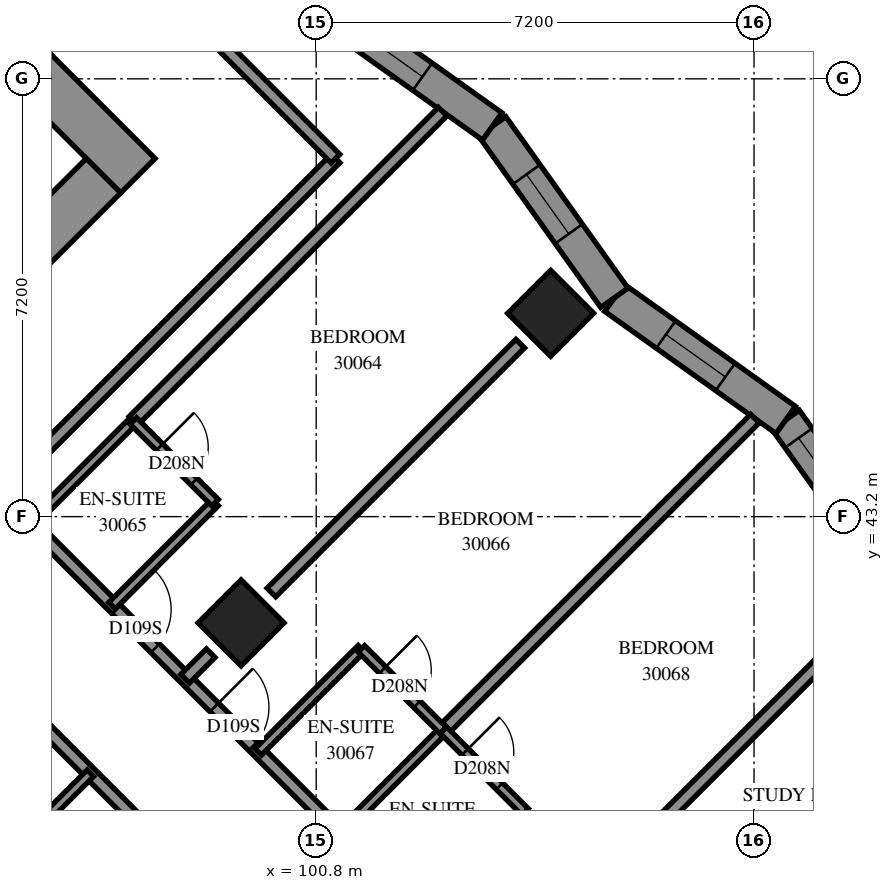
"""IFC4 building model, lengths in metres.
Left out: names, types, materials, properties, quantities, classifications, styles, units other than length and angle.
Written with IfcOpenShell. Run it as: python <this file> out.ifc"""

import sys

from ifc_helpers import new_model, si_unit, direction, frame, frame_2d, origin, origin_2d, place, context, subcontext, project, spatial, polyline, rectangle, outline, extrude, element, fill, save


model = new_model("IFC4")
c1 = context("Model", 3, precision=1e-05, world=origin(), true_north=direction((0.0, 1.0)))
c2 = subcontext(c1, "Body", "Model", "MODEL_VIEW")
j1 = project(units=[si_unit("LENGTHUNIT", "METRE"), si_unit("PLANEANGLEUNIT", "RADIAN")], contexts=[c1])
p1 = place(None, origin())
s1 = spatial("IfcSite", under=j1, at=p1, CompositionType="ELEMENT")
p2 = place(p1, origin())
s2 = spatial("IfcBuilding", under=s1, at=p2, CompositionType="ELEMENT")
p3 = place(p2, frame((0.0, 0.0, 111.8)))
s3 = spatial("IfcBuildingStorey", under=s2, at=p3, CompositionType="ELEMENT", Elevation=111.8)
for number, where, z_axis, x_axis in (
    (1, (104.656, 46.544, 0.0), (0.0, 0.0, 1.0), (0.707, -0.707, 0.0)),
    (2, (99.565, 41.453, 0.0), (0.0, 0.0, 1.0), (0.707, -0.707, 0.0)),
):
    element("IfcColumn", number, at=place(p3, frame(where, z_axis=z_axis, x_axis=x_axis)), inside=s3, PredefinedType="COLUMN", context=c2, shape_type="SweptSolid", body=[
        extrude(rectangle(XDim=1.0, YDim=1.0, at=origin_2d()), origin(), (0.0, 0.0, 1.0), 3.1),
    ])
p4 = place(p3, frame((86.554, 60.121, -0.3), z_axis=(0.0, 0.0, 1.0), x_axis=(0.7071067812, -0.7071067812, 0.0)))
e3 = element("IfcWall", 3, at=p4, inside=s3, PredefinedType="SHEAR", context=c2, shape_type="SweptSolid", body=[
    extrude(rectangle(XDim=16.0, YDim=0.8, at=frame_2d((8.0, 0.0))), origin(), (0.0, 0.0, 1.0), 2.7),
])
p5 = place(p4, frame((10.8, 0.0, 0.3)))
e4 = element("IfcOpeningElement", 4, at=p5, cuts=e3, PredefinedType="OPENING", context=c2, shape_type="SweptSolid", body=[
    extrude(rectangle(XDim=0.8, YDim=2.1, at=frame_2d((0.4, 1.05))), frame((0.0, 0.41, 0.0), z_axis=(0.0, -1.0, 0.0), x_axis=(1.0, 0.0, 0.0)), (0.0, 0.0, 1.0), 0.82),
])
p6 = place(p3, frame((87.12, 38.625, -0.3), z_axis=(0.0, 0.0, 1.0), x_axis=(0.7071067812, 0.7071067812, 0.0)))
e5 = element("IfcWall", 5, at=p6, inside=s3, PredefinedType="SHEAR", context=c2, shape_type="SweptSolid", body=[
    extrude(rectangle(XDim=14.4, YDim=0.8, at=frame_2d((7.2, 0.0))), origin(), (0.0, 0.0, 1.0), 2.7),
])
p7 = place(p6, frame((4.55, 0.0, 0.3)))
e6 = element("IfcOpeningElement", 6, at=p7, cuts=e5, PredefinedType="OPENING", context=c2, shape_type="SweptSolid", body=[
    extrude(rectangle(XDim=1.1, YDim=2.1, at=frame_2d((0.55, 1.05))), frame((0.0, 0.41, 0.0), z_axis=(0.0, -1.0, 0.0), x_axis=(1.0, 0.0, 0.0)), (0.0, 0.0, 1.0), 0.82),
])
p8 = place(p6, frame((11.35, 0.0, 0.3)))
e7 = element("IfcOpeningElement", 7, at=p8, cuts=e5, PredefinedType="OPENING", context=c2, shape_type="SweptSolid", body=[
    extrude(rectangle(XDim=1.1, YDim=2.1, at=frame_2d((0.55, 1.05))), frame((0.0, 0.41, 0.0), z_axis=(0.0, -1.0, 0.0), x_axis=(1.0, 0.0, 0.0)), (0.0, 0.0, 1.0), 0.82),
])
p9 = place(p3, frame((109.358, 36.362, 0.0), z_axis=(0.0, 0.0, 1.0), x_axis=(0.7071067812, 0.7071067812, 0.0)))
e8 = element("IfcWall", 8, at=p9, inside=s3, PredefinedType="SOLIDWALL", context=c2, shape_type="SweptSolid", body=[
    extrude(outline(polyline([(0.275, -0.275), (6.247, -0.275), (5.477, 0.275), (-0.275, 0.275), (0.275, -0.275)])), origin(), (0.0, 0.0, 1.0), 3.1),
])
p10 = place(p9, frame((1.137, 0.0, 0.6)))
e9 = element("IfcOpeningElement", 9, at=p10, cuts=e8, PredefinedType="OPENING", context=c2, shape_type="SweptSolid", body=[
    extrude(rectangle(XDim=1.8, YDim=1.9, at=frame_2d((0.9, 0.95))), frame((0.0, 0.285, 0.0), z_axis=(0.0, -1.0, 0.0), x_axis=(1.0, 0.0, 0.0)), (0.0, 0.0, 1.0), 0.57),
])
p11 = place(p9, frame((3.976, 0.0, 0.6)))
e10 = element("IfcOpeningElement", 10, at=p11, cuts=e8, PredefinedType="OPENING", context=c2, shape_type="SweptSolid", body=[
    extrude(rectangle(XDim=1.2, YDim=1.9, at=frame_2d((0.6, 0.95))), frame((0.0, 0.285, 0.0), z_axis=(0.0, -1.0, 0.0), x_axis=(1.0, 0.0, 0.0)), (0.0, 0.0, 1.0), 0.57),
])
p12 = place(p3, frame((110.544, 41.953, 0.0), z_axis=(0.0, 0.0, 1.0), x_axis=(-0.5805022438, 0.8142586474, 0.0)))
e11 = element("IfcWall", 11, at=p12, inside=s3, PredefinedType="SOLIDWALL", context=c2, shape_type="SweptSolid", body=[
    extrude(outline(polyline([(0.07, -0.275), (3.53, -0.275), (3.438, 0.275), (-0.07, 0.275), (0.07, -0.275)])), origin(), (0.0, 0.0, 1.0), 3.1),
])
p13 = place(p12, frame((0.319, 0.0, 0.5)))
e12 = element("IfcOpeningElement", 12, at=p13, cuts=e11, PredefinedType="OPENING", context=c2, shape_type="SweptSolid", body=[
    extrude(rectangle(XDim=1.3, YDim=2.45, at=frame_2d((0.65, 1.225))), frame((0.0, 0.285, 0.0), z_axis=(0.0, -1.0, 0.0), x_axis=(1.0, 0.0, 0.0)), (0.0, 0.0, 1.0), 0.57),
])
p14 = place(p12, frame((1.819, 0.0, 0.5)))
e13 = element("IfcOpeningElement", 13, at=p14, cuts=e11, PredefinedType="OPENING", context=c2, shape_type="SweptSolid", body=[
    extrude(rectangle(XDim=1.3, YDim=2.45, at=frame_2d((0.65, 1.225))), frame((0.0, 0.285, 0.0), z_axis=(0.0, -1.0, 0.0), x_axis=(1.0, 0.0, 0.0)), (0.0, 0.0, 1.0), 0.57),
])
p15 = place(p3, frame((108.522, 44.79, 0.0), z_axis=(0.0, 0.0, 1.0), x_axis=(-0.8142544581, 0.5805081201, 0.0)))
e14 = element("IfcWall", 14, at=p15, inside=s3, PredefinedType="SOLIDWALL", context=c2, shape_type="SweptSolid", body=[
    extrude(outline(polyline([(-0.046, -0.275), (3.414, -0.275), (3.507, 0.275), (0.046, 0.275), (-0.046, -0.275)])), origin(), (0.0, 0.0, 1.0), 3.1),
])
p16 = place(p15, frame((1.22, 0.0, 0.5)))
e15 = element("IfcOpeningElement", 15, at=p16, cuts=e14, PredefinedType="OPENING", context=c2, shape_type="SweptSolid", body=[
    extrude(rectangle(XDim=1.2, YDim=2.45, at=frame_2d((0.6, 1.225))), frame((0.0, 0.285, 0.0), z_axis=(0.0, -1.0, 0.0), x_axis=(1.0, 0.0, 0.0)), (0.0, 0.0, 1.0), 0.57),
])
p17 = place(p3, frame((105.704, 46.799, 0.0), z_axis=(0.0, 0.0, 1.0), x_axis=(-0.5805081201, 0.8142544581, 0.0)))
e16 = element("IfcWall", 16, at=p17, inside=s3, PredefinedType="SOLIDWALL", context=c2, shape_type="SweptSolid", body=[
    extrude(outline(polyline([(0.046, -0.275), (3.507, -0.275), (3.414, 0.275), (-0.046, 0.275), (0.046, -0.275)])), origin(), (0.0, 0.0, 1.0), 3.1),
])
p18 = place(p17, frame((1.292, 0.0, 0.5)))
e17 = element("IfcOpeningElement", 17, at=p18, cuts=e16, PredefinedType="OPENING", context=c2, shape_type="SweptSolid", body=[
    extrude(rectangle(XDim=1.2, YDim=2.45, at=frame_2d((0.6, 1.225))), frame((0.0, 0.285, 0.0), z_axis=(0.0, -1.0, 0.0), x_axis=(1.0, 0.0, 0.0)), (0.0, 0.0, 1.0), 0.57),
])
p19 = place(p3, frame((103.695, 49.617, 0.0), z_axis=(0.0, 0.0, 1.0), x_axis=(-0.8142407991, 0.5805272785, 0.0)))
e18 = element("IfcWall", 18, at=p19, inside=s3, PredefinedType="SOLIDWALL", context=c2, shape_type="SweptSolid", body=[
    extrude(outline(polyline([(-0.046, -0.275), (3.414, -0.275), (3.507, 0.275), (0.046, 0.275), (-0.046, -0.275)])), origin(), (0.0, 0.0, 1.0), 3.1),
])
p20 = place(p19, frame((1.409, 0.0, 0.5)))
e19 = element("IfcOpeningElement", 19, at=p20, cuts=e18, PredefinedType="OPENING", context=c2, shape_type="SweptSolid", body=[
    extrude(rectangle(XDim=1.2, YDim=2.45, at=frame_2d((0.6, 1.225))), frame((0.0, 0.285, 0.0), z_axis=(0.0, -1.0, 0.0), x_axis=(1.0, 0.0, 0.0)), (0.0, 0.0, 1.0), 0.57),
])
p21 = place(p3, frame((94.047, 42.015, 0.0), z_axis=(0.0, 0.0, 1.0), x_axis=(0.7071067812, -0.7071067812, 0.0)))
e20 = element("IfcWall", 20, at=p21, inside=s3, PredefinedType="PARTITIONING", context=c2, shape_type="SweptSolid", body=[
    extrude(rectangle(XDim=9.6, YDim=0.2, at=frame_2d((4.8, 0.0))), origin(), (0.0, 0.0, 1.0), 3.1),
])
p22 = place(p21, frame((1.099, 0.0, 0.0)))
e21 = element("IfcOpeningElement", 21, at=p22, cuts=e20, PredefinedType="OPENING", context=c2, shape_type="SweptSolid", body=[
    extrude(rectangle(XDim=0.9, YDim=2.1, at=frame_2d((0.45, 1.05))), frame((0.0, 0.11, 0.0), z_axis=(0.0, -1.0, 0.0), x_axis=(1.0, 0.0, 0.0)), (0.0, 0.0, 1.0), 0.22),
])
p23 = place(p21, frame((6.649, 0.0, 0.0)))
e22 = element("IfcOpeningElement", 22, at=p23, cuts=e20, PredefinedType="OPENING", context=c2, shape_type="SweptSolid", body=[
    extrude(rectangle(XDim=0.9, YDim=2.1, at=frame_2d((0.45, 1.05))), frame((0.0, 0.11, 0.0), z_axis=(0.0, -1.0, 0.0), x_axis=(1.0, 0.0, 0.0)), (0.0, 0.0, 1.0), 0.22),
])
p24 = place(p21, frame((8.3, 0.0, 0.0)))
e23 = element("IfcOpeningElement", 23, at=p24, cuts=e20, PredefinedType="OPENING", context=c2, shape_type="SweptSolid", body=[
    extrude(rectangle(XDim=0.9, YDim=2.1, at=frame_2d((0.45, 1.05))), frame((0.0, 0.11, 0.0), z_axis=(0.0, -1.0, 0.0), x_axis=(1.0, 0.0, 0.0)), (0.0, 0.0, 1.0), 0.22),
])
p25 = place(p3, frame((96.103, 43.083, 0.0), z_axis=(0.0, 0.0, 1.0), x_axis=(0.7071067812, -0.7071067812, 0.0)))
e24 = element("IfcWall", 24, at=p25, inside=s3, PredefinedType="PARTITIONING", context=c2, shape_type="SweptSolid", body=[
    extrude(rectangle(XDim=8.491, YDim=0.2, at=frame_2d((4.245, 0.0))), origin(), (0.0, 0.0, 1.0), 3.1),
])
p26 = place(p25, frame((1.995, 0.0, 0.0)))
e25 = element("IfcOpeningElement", 25, at=p26, cuts=e24, PredefinedType="OPENING", context=c2, shape_type="SweptSolid", body=[
    extrude(rectangle(XDim=0.9, YDim=2.1, at=frame_2d((0.45, 1.05))), frame((0.0, 0.11, 0.0), z_axis=(0.0, -1.0, 0.0), x_axis=(1.0, 0.0, 0.0)), (0.0, 0.0, 1.0), 0.22),
])
p27 = place(p25, frame((4.27, 0.0, 0.0)))
e26 = element("IfcOpeningElement", 26, at=p27, cuts=e24, PredefinedType="OPENING", context=c2, shape_type="SweptSolid", body=[
    extrude(rectangle(XDim=0.9, YDim=2.1, at=frame_2d((0.45, 1.05))), frame((0.0, 0.11, 0.0), z_axis=(0.0, -1.0, 0.0), x_axis=(1.0, 0.0, 0.0)), (0.0, 0.0, 1.0), 0.22),
])
p28 = place(p3, frame((95.606, 43.577, 0.0), z_axis=(0.0, 0.0, 1.0), x_axis=(0.7071067812, 0.7071067812, 0.0)))
e27 = element("IfcWall", 27, at=p28, inside=s3, PredefinedType="PARTITIONING", context=c2, shape_type="SweptSolid", body=[
    extrude(rectangle(XDim=7.798, YDim=0.2, at=frame_2d((3.899, 0.0))), origin(), (0.0, 0.0, 1.0), 3.1),
])
p29 = place(p3, frame((102.888, 39.687, 0.0), z_axis=(0.0, 0.0, 1.0), x_axis=(0.7072515706, 0.7069619621, 0.0)))
e28 = element("IfcWall", 28, at=p29, inside=s3, PredefinedType="PARTITIONING", context=c2, shape_type="SweptSolid", body=[
    extrude(rectangle(XDim=7.251, YDim=0.2, at=frame_2d((3.626, 0.0))), origin(), (0.0, 0.0, 1.0), 3.1),
])
p30 = place(p3, frame((97.795, 44.777, 0.0), z_axis=(0.0, 0.0, 1.0), x_axis=(0.7071137356, 0.7070998267, 0.0)))
e29 = element("IfcWall", 29, at=p30, inside=s3, PredefinedType="PARTITIONING", context=c2, shape_type="SweptSolid", body=[
    extrude(rectangle(XDim=7.19, YDim=0.2, at=frame_2d((3.595, 0.0))), origin(), (0.0, 0.0, 1.0), 3.1),
])
for number, where, z_axis, x_axis in (
    (30, (105.155, 36.863, 0.0), (0.0, 0.0, 1.0), (0.707, 0.707, 0.0)),
    (31, (100.063, 41.953, 0.0), (0.0, 0.0, 1.0), (0.707, 0.707, 0.0)),
):
    element("IfcWall", number, at=place(p3, frame(where, z_axis=z_axis, x_axis=x_axis)), inside=s3, PredefinedType="PARTITIONING", context=c2, shape_type="SweptSolid", body=[
        extrude(rectangle(XDim=5.787, YDim=0.2, at=frame_2d((2.893, 0.0))), origin(), (0.0, 0.0, 1.0), 3.1),
    ])
p31 = place(p3, frame((94.047, 38.621, 0.0), z_axis=(0.0, 0.0, 1.0), x_axis=(0.7071067812, -0.7071067812, 0.0)))
e32 = element("IfcWall", 32, at=p31, inside=s3, PredefinedType="PARTITIONING", context=c2, shape_type="SweptSolid", body=[
    extrude(rectangle(XDim=3.799, YDim=0.15, at=frame_2d((1.899, 0.0))), origin(), (0.0, 0.0, 1.0), 3.1),
])
p32 = place(p31, frame((0.444, 0.0, 0.0)))
e33 = element("IfcOpeningElement", 33, at=p32, cuts=e32, PredefinedType="OPENING", context=c2, shape_type="SweptSolid", body=[
    extrude(rectangle(XDim=0.8, YDim=2.1, at=frame_2d((0.4, 1.05))), frame((0.0, 0.085, 0.0), z_axis=(0.0, -1.0, 0.0), x_axis=(1.0, 0.0, 0.0)), (0.0, 0.0, 1.0), 0.17),
])
p33 = place(p31, frame((2.551, 0.0, 0.0)))
e34 = element("IfcOpeningElement", 34, at=p33, cuts=e32, PredefinedType="OPENING", context=c2, shape_type="SweptSolid", body=[
    extrude(rectangle(XDim=0.8, YDim=2.1, at=frame_2d((0.4, 1.05))), frame((0.0, 0.085, 0.0), z_axis=(0.0, -1.0, 0.0), x_axis=(1.0, 0.0, 0.0)), (0.0, 0.0, 1.0), 0.17),
])
p34 = place(p3, frame((99.071, 51.133, 0.0), z_axis=(0.0, 0.0, 1.0), x_axis=(0.7071067812, -0.7071067812, 0.0)))
e35 = element("IfcWall", 35, at=p34, inside=s3, PredefinedType="PARTITIONING", context=c2, shape_type="SweptSolid", body=[
    extrude(rectangle(XDim=2.893, YDim=0.2, at=frame_2d((1.447, 0.0))), origin(), (0.0, 0.0, 1.0), 3.1),
])
p35 = place(p3, frame((102.533, 36.645, 0.0), z_axis=(0.0, 0.0, 1.0), x_axis=(0.7071067812, 0.7071067812, 0.0)))
e36 = element("IfcWall", 36, at=p35, inside=s3, PredefinedType="PARTITIONING", context=c2, shape_type="SweptSolid", body=[
    extrude(rectangle(XDim=2.401, YDim=0.15, at=frame_2d((1.201, 0.0))), origin(), (0.0, 0.0, 1.0), 3.1),
])
for number, where, z_axis, x_axis in (
    (37, (101.192, 37.988, 0.0), (0.0, 0.0, 1.0), (0.707, 0.708, 0.0)),
    (38, (95.389, 37.285, 0.0), (0.0, 0.0, 1.0), (0.708, 0.707, 0.0)),
):
    element("IfcWall", number, at=place(p3, frame(where, z_axis=z_axis, x_axis=x_axis)), inside=s3, PredefinedType="PARTITIONING", context=c2, shape_type="SweptSolid", body=[
        extrude(rectangle(XDim=2.4, YDim=0.15, at=frame_2d((1.2, 0.0))), origin(), (0.0, 0.0, 1.0), 3.1),
    ])
for number, where, z_axis, x_axis in (
    (39, (97.443, 41.737, 0.0), (0.0, 0.0, 1.0), (0.707, 0.707, 0.0)),
    (40, (96.099, 43.081, 0.0), (0.0, 0.0, 1.0), (0.707, 0.707, 0.0)),
    (41, (99.847, 39.333, 0.0), (0.0, 0.0, 1.0), (0.707, 0.707, 0.0)),
):
    element("IfcWall", number, at=place(p3, frame(where, z_axis=z_axis, x_axis=x_axis)), inside=s3, PredefinedType="PARTITIONING", context=c2, shape_type="SweptSolid", body=[
        extrude(rectangle(XDim=2.398, YDim=0.15, at=frame_2d((1.199, 0.0))), origin(), (0.0, 0.0, 1.0), 3.1),
    ])
p36 = place(p3, frame((97.793, 44.773, 0.0), z_axis=(0.0, 0.0, 1.0), x_axis=(0.7071067812, -0.7071067812, 0.0)))
e42 = element("IfcWall", 42, at=p36, inside=s3, PredefinedType="PARTITIONING", context=c2, shape_type="SweptSolid", body=[
    extrude(rectangle(XDim=1.901, YDim=0.15, at=frame_2d((0.95, 0.0))), origin(), (0.0, 0.0, 1.0), 3.1),
])
p37 = place(p36, frame((0.609, 0.0, 0.0)))
e43 = element("IfcOpeningElement", 43, at=p37, cuts=e42, PredefinedType="OPENING", context=c2, shape_type="SweptSolid", body=[
    extrude(rectangle(XDim=0.8, YDim=2.1, at=frame_2d((0.4, 1.05))), frame((0.0, 0.085, 0.0), z_axis=(0.0, -1.0, 0.0), x_axis=(1.0, 0.0, 0.0)), (0.0, 0.0, 1.0), 0.17),
])
p38 = place(p3, frame((102.891, 39.69, 0.0), z_axis=(0.0, 0.0, 1.0), x_axis=(0.7071067812, -0.7071067812, 0.0)))
e44 = element("IfcWall", 44, at=p38, inside=s3, PredefinedType="PARTITIONING", context=c2, shape_type="SweptSolid", body=[
    extrude(rectangle(XDim=1.901, YDim=0.15, at=frame_2d((0.95, 0.0))), origin(), (0.0, 0.0, 1.0), 3.1),
])
p39 = place(p38, frame((0.505, 0.0, 0.0)))
e45 = element("IfcOpeningElement", 45, at=p39, cuts=e44, PredefinedType="OPENING", context=c2, shape_type="SweptSolid", body=[
    extrude(rectangle(XDim=0.8, YDim=2.1, at=frame_2d((0.4, 1.05))), frame((0.0, 0.085, 0.0), z_axis=(0.0, -1.0, 0.0), x_axis=(1.0, 0.0, 0.0)), (0.0, 0.0, 1.0), 0.17),
])
p40 = place(p3, frame((101.543, 41.027, 0.0), z_axis=(0.0, 0.0, 1.0), x_axis=(0.7076330979, -0.7065800724, 0.0)))
e46 = element("IfcWall", 46, at=p40, inside=s3, PredefinedType="PARTITIONING", context=c2, shape_type="SweptSolid", body=[
    extrude(rectangle(XDim=1.899, YDim=0.15, at=frame_2d((0.95, 0.0))), origin(), (0.0, 0.0, 1.0), 3.1),
])
p41 = place(p40, frame((0.493, 0.0, 0.0)))
e47 = element("IfcOpeningElement", 47, at=p41, cuts=e46, PredefinedType="OPENING", context=c2, shape_type="SweptSolid", body=[
    extrude(rectangle(XDim=0.8, YDim=2.1, at=frame_2d((0.4, 1.05))), frame((0.0, 0.085, 0.0), z_axis=(0.0, -1.0, 0.0), x_axis=(1.0, 0.0, 0.0)), (0.0, 0.0, 1.0), 0.17),
])
p42 = place(p3, frame((98.645, 40.535, 0.0), z_axis=(0.0, 0.0, 1.0), x_axis=(0.7071067812, 0.7071067812, 0.0)))
e48 = element("IfcWall", 48, at=p42, inside=s3, PredefinedType="PARTITIONING", context=c2, shape_type="SweptSolid", body=[
    extrude(rectangle(XDim=0.594, YDim=0.2, at=frame_2d((0.297, 0.0))), origin(), (0.0, 0.0, 1.0), 3.1),
])
p43 = place(p14, origin())
e49 = element("IfcWindow", 49, at=p43, inside=s3, PartitioningType="SINGLE_PANEL", PredefinedType="WINDOW", context=c2, shape_type="SweptSolid", body=[
    extrude(rectangle(XDim=1.3, YDim=2.45, at=frame_2d((0.65, 1.225))), frame((0.0, 0.155, 0.0), z_axis=(0.0, -1.0, 0.0), x_axis=(1.0, 0.0, 0.0)), (0.0, 0.0, 1.0), 0.06),
])
fill(e13, e49)
p44 = place(p16, origin())
e50 = element("IfcWindow", 50, at=p44, inside=s3, PartitioningType="SINGLE_PANEL", PredefinedType="WINDOW", context=c2, shape_type="SweptSolid", body=[
    extrude(rectangle(XDim=1.2, YDim=2.45, at=frame_2d((0.6, 1.225))), frame((0.0, 0.155, 0.0), z_axis=(0.0, -1.0, 0.0), x_axis=(1.0, 0.0, 0.0)), (0.0, 0.0, 1.0), 0.06),
])
fill(e15, e50)
p45 = place(p18, origin())
e51 = element("IfcWindow", 51, at=p45, inside=s3, PartitioningType="SINGLE_PANEL", PredefinedType="WINDOW", context=c2, shape_type="SweptSolid", body=[
    extrude(rectangle(XDim=1.2, YDim=2.45, at=frame_2d((0.6, 1.225))), frame((0.0, 0.155, 0.0), z_axis=(0.0, -1.0, 0.0), x_axis=(1.0, 0.0, 0.0)), (0.0, 0.0, 1.0), 0.06),
])
fill(e17, e51)
p46 = place(p20, origin())
e52 = element("IfcWindow", 52, at=p46, inside=s3, PartitioningType="SINGLE_PANEL", PredefinedType="WINDOW", context=c2, shape_type="SweptSolid", body=[
    extrude(rectangle(XDim=1.2, YDim=2.45, at=frame_2d((0.6, 1.225))), frame((0.0, 0.155, 0.0), z_axis=(0.0, -1.0, 0.0), x_axis=(1.0, 0.0, 0.0)), (0.0, 0.0, 1.0), 0.06),
])
fill(e19, e52)
p47 = place(p26, origin())
e53 = element("IfcDoor", 53, at=p47, inside=s3, OperationType="SINGLE_SWING_RIGHT", PredefinedType="DOOR", context=c2, shape_type="SweptSolid", body=[
    extrude(rectangle(XDim=0.9, YDim=2.1, at=frame_2d((0.45, 1.05))), frame((0.0, 0.025, 0.0), z_axis=(0.0, -1.0, 0.0), x_axis=(1.0, 0.0, 0.0)), (0.0, 0.0, 1.0), 0.05),
])
fill(e25, e53)
p48 = place(p37, origin())
e54 = element("IfcDoor", 54, at=p48, inside=s3, OperationType="SINGLE_SWING_RIGHT", PredefinedType="DOOR", context=c2, shape_type="SweptSolid", body=[
    extrude(rectangle(XDim=0.8, YDim=2.1, at=frame_2d((0.4, 1.05))), frame((0.0, 0.025, 0.0), z_axis=(0.0, -1.0, 0.0), x_axis=(1.0, 0.0, 0.0)), (0.0, 0.0, 1.0), 0.05),
])
fill(e43, e54)
p49 = place(p27, origin())
e55 = element("IfcDoor", 55, at=p49, inside=s3, OperationType="SINGLE_SWING_LEFT", PredefinedType="DOOR", context=c2, shape_type="SweptSolid", body=[
    extrude(rectangle(XDim=0.9, YDim=2.1, at=frame_2d((0.45, 1.05))), frame((0.0, 0.025, 0.0), z_axis=(0.0, -1.0, 0.0), x_axis=(1.0, 0.0, 0.0)), (0.0, 0.0, 1.0), 0.05),
])
fill(e26, e55)
p50 = place(p41, origin())
e56 = element("IfcDoor", 56, at=p50, inside=s3, OperationType="SINGLE_SWING_RIGHT", PredefinedType="DOOR", context=c2, shape_type="SweptSolid", body=[
    extrude(rectangle(XDim=0.8, YDim=2.1, at=frame_2d((0.4, 1.05))), frame((0.0, 0.025, 0.0), z_axis=(0.0, -1.0, 0.0), x_axis=(1.0, 0.0, 0.0)), (0.0, 0.0, 1.0), 0.05),
])
fill(e47, e56)
p51 = place(p39, origin())
e57 = element("IfcDoor", 57, at=p51, inside=s3, OperationType="SINGLE_SWING_RIGHT", PredefinedType="DOOR", context=c2, shape_type="SweptSolid", body=[
    extrude(rectangle(XDim=0.8, YDim=2.1, at=frame_2d((0.4, 1.05))), frame((0.0, 0.025, 0.0), z_axis=(0.0, -1.0, 0.0), x_axis=(1.0, 0.0, 0.0)), (0.0, 0.0, 1.0), 0.05),
])
fill(e45, e57)
save(model, sys.argv[1])
